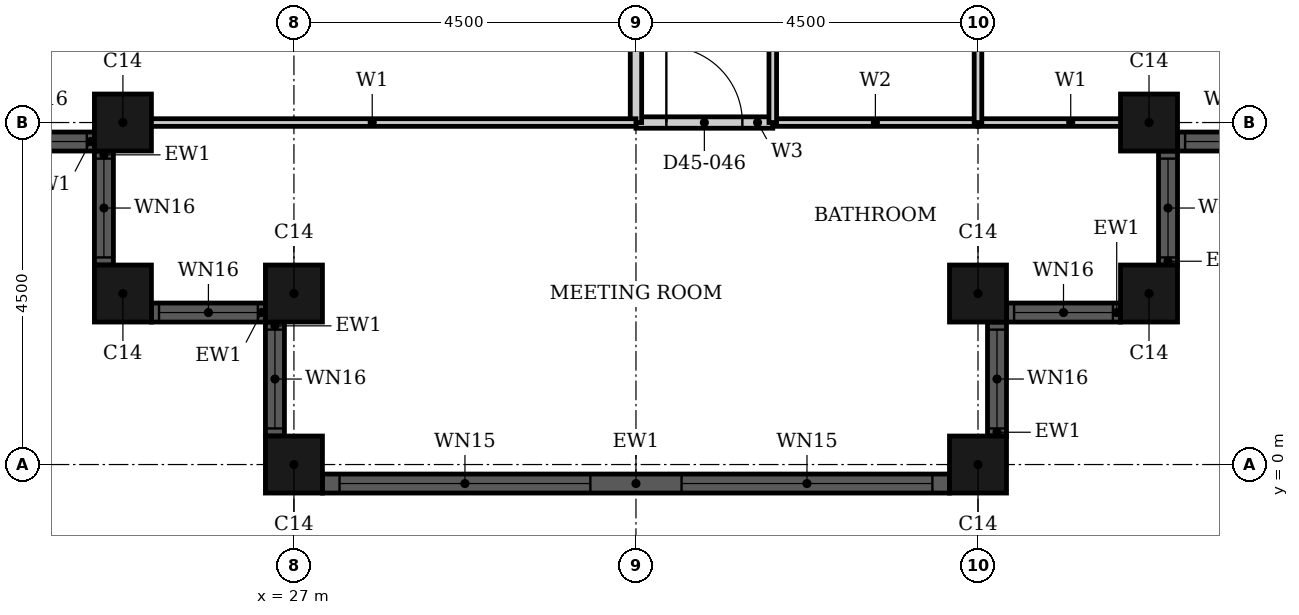
"""IFC4 building model, lengths in metres.
Left out: names, types, materials, properties, quantities, classifications, styles, units other than length and angle.
Written with IfcOpenShell. Run it as: python <this file> out.ifc"""

import sys

from ifc_helpers import new_model, si_unit, direction, frame, frame_2d, origin, origin_2d, place, context, subcontext, project, spatial, rectangle, hollow_rectangle, extrude, element, fill, save


model = new_model("IFC4")
c1 = context("Model", 3, precision=1e-05, world=origin(), true_north=direction((0.0, 1.0)))
c2 = subcontext(c1, "Body", "Model", "MODEL_VIEW")
j1 = project(units=[si_unit("LENGTHUNIT", "METRE"), si_unit("PLANEANGLEUNIT", "RADIAN")], contexts=[c1])
p1 = place(None, origin())
s1 = spatial("IfcSite", under=j1, at=p1, CompositionType="ELEMENT")
p2 = place(p1, origin())
s2 = spatial("IfcBuilding", under=s1, at=p2, CompositionType="ELEMENT")
p3 = place(p2, frame((0.0, 0.0, 180.2)))
s3 = spatial("IfcBuildingStorey", under=s2, at=p3, CompositionType="ELEMENT", Elevation=180.2)
for number, where, z_axis, x_axis in (
    (1, (24.75, 4.5, 0.0), (0.0, 0.0, 1.0), (1.0, 0.0, 0.0)),
    (2, (24.75, 2.25, 0.0), (0.0, 0.0, 1.0), (1.0, 0.0, 0.0)),
    (3, (27.0, 2.25, 0.0), (0.0, 0.0, 1.0), (1.0, 0.0, 0.0)),
    (4, (27.0, 0.0, 0.0), (0.0, 0.0, 1.0), (1.0, 0.0, 0.0)),
    (5, (36.0, 0.0, 0.0), (0.0, 0.0, 1.0), (1.0, 0.0, 0.0)),
    (6, (36.0, 2.25, 0.0), (0.0, 0.0, 1.0), (1.0, 0.0, 0.0)),
    (7, (38.25, 2.25, 0.0), (0.0, 0.0, 1.0), (1.0, 0.0, 0.0)),
    (8, (38.25, 4.5, 0.0), (0.0, 0.0, 1.0), (1.0, 0.0, 0.0)),
):
    element("IfcColumn", number, at=place(p3, frame(where, z_axis=z_axis, x_axis=x_axis)), inside=s3, PredefinedType="COLUMN", context=c2, shape_type="SweptSolid", body=[
        extrude(hollow_rectangle(XDim=0.75, YDim=0.75, WallThickness=0.024, at=origin_2d()), origin(), (0.0, 0.0, 1.0), 3.7),
    ])
p4 = place(p3, frame((22.875, 4.25, 0.0), z_axis=(0.0, 0.0, 1.0), x_axis=(1.0, 0.0, 0.0)))
e9 = element("IfcWall", 9, at=p4, inside=s3, PredefinedType="SOLIDWALL", context=c2, shape_type="SweptSolid", body=[
    extrude(rectangle(XDim=1.5, YDim=0.25, at=frame_2d((0.75, 0.0))), origin(), (0.0, 0.0, 1.0), 3.7),
])
p5 = place(p4, frame((0.1, 0.0, 0.9)))
e10 = element("IfcOpeningElement", 10, at=p5, cuts=e9, PredefinedType="OPENING", context=c2, shape_type="SweptSolid", body=[
    extrude(rectangle(XDim=1.3, YDim=1.85, at=frame_2d((0.65, 0.925))), frame((0.0, 0.135, 0.0), z_axis=(0.0, -1.0, 0.0), x_axis=(1.0, 0.0, 0.0)), (0.0, 0.0, 1.0), 0.27),
])
p6 = place(p3, frame((24.5, 4.125, 0.0), z_axis=(0.0, 0.0, 1.0), x_axis=(0.0, -1.0, 0.0)))
e11 = element("IfcWall", 11, at=p6, inside=s3, PredefinedType="SOLIDWALL", context=c2, shape_type="SweptSolid", body=[
    extrude(rectangle(XDim=1.5, YDim=0.25, at=frame_2d((0.75, 0.0))), origin(), (0.0, 0.0, 1.0), 3.7),
])
p7 = place(p6, frame((0.1, 0.0, 0.9)))
e12 = element("IfcOpeningElement", 12, at=p7, cuts=e11, PredefinedType="OPENING", context=c2, shape_type="SweptSolid", body=[
    extrude(rectangle(XDim=1.3, YDim=1.85, at=frame_2d((0.65, 0.925))), frame((0.0, 0.135, 0.0), z_axis=(0.0, -1.0, 0.0), x_axis=(1.0, 0.0, 0.0)), (0.0, 0.0, 1.0), 0.27),
])
p8 = place(p3, frame((25.125, 2.0, 0.0), z_axis=(0.0, 0.0, 1.0), x_axis=(1.0, 0.0, 0.0)))
e13 = element("IfcWall", 13, at=p8, inside=s3, PredefinedType="SOLIDWALL", context=c2, shape_type="SweptSolid", body=[
    extrude(rectangle(XDim=1.5, YDim=0.25, at=frame_2d((0.75, 0.0))), origin(), (0.0, 0.0, 1.0), 3.7),
])
p9 = place(p8, frame((0.1, 0.0, 0.9)))
e14 = element("IfcOpeningElement", 14, at=p9, cuts=e13, PredefinedType="OPENING", context=c2, shape_type="SweptSolid", body=[
    extrude(rectangle(XDim=1.3, YDim=1.85, at=frame_2d((0.65, 0.925))), frame((0.0, 0.135, 0.0), z_axis=(0.0, -1.0, 0.0), x_axis=(1.0, 0.0, 0.0)), (0.0, 0.0, 1.0), 0.27),
])
p10 = place(p3, frame((26.75, 1.875, 0.0), z_axis=(0.0, 0.0, 1.0), x_axis=(0.0, -1.0, 0.0)))
e15 = element("IfcWall", 15, at=p10, inside=s3, PredefinedType="SOLIDWALL", context=c2, shape_type="SweptSolid", body=[
    extrude(rectangle(XDim=1.5, YDim=0.25, at=frame_2d((0.75, 0.0))), origin(), (0.0, 0.0, 1.0), 3.7),
])
p11 = place(p10, frame((0.1, 0.0, 0.9)))
e16 = element("IfcOpeningElement", 16, at=p11, cuts=e15, PredefinedType="OPENING", context=c2, shape_type="SweptSolid", body=[
    extrude(rectangle(XDim=1.3, YDim=1.85, at=frame_2d((0.65, 0.925))), frame((0.0, 0.135, 0.0), z_axis=(0.0, -1.0, 0.0), x_axis=(1.0, 0.0, 0.0)), (0.0, 0.0, 1.0), 0.27),
])
p12 = place(p3, frame((27.375, -0.25, 0.0), z_axis=(0.0, 0.0, 1.0), x_axis=(1.0, 0.0, 0.0)))
e17 = element("IfcWall", 17, at=p12, inside=s3, PredefinedType="SOLIDWALL", context=c2, shape_type="SweptSolid", body=[
    extrude(rectangle(XDim=8.25, YDim=0.25, at=frame_2d((4.125, 0.0))), origin(), (0.0, 0.0, 1.0), 3.7),
])
p13 = place(p12, frame((0.225, 0.0, 0.45)))
e18 = element("IfcOpeningElement", 18, at=p13, cuts=e17, PredefinedType="OPENING", context=c2, shape_type="SweptSolid", body=[
    extrude(rectangle(XDim=3.3, YDim=2.3, at=frame_2d((1.65, 1.15))), frame((0.0, 0.135, 0.0), z_axis=(0.0, -1.0, 0.0), x_axis=(1.0, 0.0, 0.0)), (0.0, 0.0, 1.0), 0.27),
])
p14 = place(p12, frame((4.725, 0.0, 0.45)))
e19 = element("IfcOpeningElement", 19, at=p14, cuts=e17, PredefinedType="OPENING", context=c2, shape_type="SweptSolid", body=[
    extrude(rectangle(XDim=3.3, YDim=2.3, at=frame_2d((1.65, 1.15))), frame((0.0, 0.135, 0.0), z_axis=(0.0, -1.0, 0.0), x_axis=(1.0, 0.0, 0.0)), (0.0, 0.0, 1.0), 0.27),
])
p15 = place(p3, frame((36.25, 0.375, 0.0), z_axis=(0.0, 0.0, 1.0), x_axis=(0.0, 1.0, 0.0)))
e20 = element("IfcWall", 20, at=p15, inside=s3, PredefinedType="SOLIDWALL", context=c2, shape_type="SweptSolid", body=[
    extrude(rectangle(XDim=1.5, YDim=0.25, at=frame_2d((0.75, 0.0))), origin(), (0.0, 0.0, 1.0), 3.7),
])
p16 = place(p15, frame((0.1, 0.0, 0.9)))
e21 = element("IfcOpeningElement", 21, at=p16, cuts=e20, PredefinedType="OPENING", context=c2, shape_type="SweptSolid", body=[
    extrude(rectangle(XDim=1.3, YDim=1.85, at=frame_2d((0.65, 0.925))), frame((0.0, 0.135, 0.0), z_axis=(0.0, -1.0, 0.0), x_axis=(1.0, 0.0, 0.0)), (0.0, 0.0, 1.0), 0.27),
])
p17 = place(p3, frame((36.375, 2.0, 0.0), z_axis=(0.0, 0.0, 1.0), x_axis=(1.0, 0.0, 0.0)))
e22 = element("IfcWall", 22, at=p17, inside=s3, PredefinedType="SOLIDWALL", context=c2, shape_type="SweptSolid", body=[
    extrude(rectangle(XDim=1.5, YDim=0.25, at=frame_2d((0.75, 0.0))), origin(), (0.0, 0.0, 1.0), 3.7),
])
p18 = place(p17, frame((0.1, 0.0, 0.9)))
e23 = element("IfcOpeningElement", 23, at=p18, cuts=e22, PredefinedType="OPENING", context=c2, shape_type="SweptSolid", body=[
    extrude(rectangle(XDim=1.3, YDim=1.85, at=frame_2d((0.65, 0.925))), frame((0.0, 0.135, 0.0), z_axis=(0.0, -1.0, 0.0), x_axis=(1.0, 0.0, 0.0)), (0.0, 0.0, 1.0), 0.27),
])
p19 = place(p3, frame((38.5, 2.625, 0.0), z_axis=(0.0, 0.0, 1.0), x_axis=(0.0, 1.0, 0.0)))
e24 = element("IfcWall", 24, at=p19, inside=s3, PredefinedType="SOLIDWALL", context=c2, shape_type="SweptSolid", body=[
    extrude(rectangle(XDim=1.5, YDim=0.25, at=frame_2d((0.75, 0.0))), origin(), (0.0, 0.0, 1.0), 3.7),
])
p20 = place(p19, frame((0.1, 0.0, 0.9)))
e25 = element("IfcOpeningElement", 25, at=p20, cuts=e24, PredefinedType="OPENING", context=c2, shape_type="SweptSolid", body=[
    extrude(rectangle(XDim=1.3, YDim=1.85, at=frame_2d((0.65, 0.925))), frame((0.0, 0.135, 0.0), z_axis=(0.0, -1.0, 0.0), x_axis=(1.0, 0.0, 0.0)), (0.0, 0.0, 1.0), 0.27),
])
p21 = place(p3, frame((38.625, 4.25, 0.0), z_axis=(0.0, 0.0, 1.0), x_axis=(1.0, 0.0, 0.0)))
e26 = element("IfcWall", 26, at=p21, inside=s3, PredefinedType="SOLIDWALL", context=c2, shape_type="SweptSolid", body=[
    extrude(rectangle(XDim=1.5, YDim=0.25, at=frame_2d((0.75, 0.0))), origin(), (0.0, 0.0, 1.0), 3.7),
])
p22 = place(p21, frame((0.1, 0.0, 0.9)))
e27 = element("IfcOpeningElement", 27, at=p22, cuts=e26, PredefinedType="OPENING", context=c2, shape_type="SweptSolid", body=[
    extrude(rectangle(XDim=1.3, YDim=1.85, at=frame_2d((0.65, 0.925))), frame((0.0, 0.135, 0.0), z_axis=(0.0, -1.0, 0.0), x_axis=(1.0, 0.0, 0.0)), (0.0, 0.0, 1.0), 0.27),
])
p23 = place(p3, frame((31.5, 4.5, 0.0), z_axis=(0.0, 0.0, 1.0), x_axis=(1.0, 0.0, 0.0)))
e28 = element("IfcWall", 28, at=p23, inside=s3, PredefinedType="PARTITIONING", context=c2, shape_type="SweptSolid", body=[
    extrude(rectangle(XDim=1.8, YDim=0.15, at=frame_2d((0.9, 0.0))), origin(), (0.0, 0.0, 1.0), 3.4),
])
p24 = place(p23, frame((0.4, 0.0, 0.0)))
e29 = element("IfcOpeningElement", 29, at=p24, cuts=e28, PredefinedType="OPENING", context=c2, shape_type="SweptSolid", body=[
    extrude(rectangle(XDim=1.0, YDim=2.1, at=frame_2d((0.5, 1.05))), frame((0.0, 0.085, 0.0), z_axis=(0.0, -1.0, 0.0), x_axis=(1.0, 0.0, 0.0)), (0.0, 0.0, 1.0), 0.17),
])
p25 = place(p3, frame((31.5, 4.5, 0.0), z_axis=(0.0, 0.0, 1.0), x_axis=(0.0, 1.0, 0.0)))
e30 = element("IfcWall", 30, at=p25, inside=s3, PredefinedType="PARTITIONING", context=c2, shape_type="SweptSolid", body=[
    extrude(rectangle(XDim=16.2, YDim=0.15, at=frame_2d((8.1, 0.0))), origin(), (0.0, 0.0, 1.0), 2.68),
])
p26 = place(p25, frame((4.0, 0.0, 0.0)))
e31 = element("IfcOpeningElement", 31, at=p26, cuts=e30, PredefinedType="OPENING", context=c2, shape_type="SweptSolid", body=[
    extrude(rectangle(XDim=1.0, YDim=2.1, at=frame_2d((0.5, 1.05))), frame((0.0, 0.085, 0.0), z_axis=(0.0, -1.0, 0.0), x_axis=(1.0, 0.0, 0.0)), (0.0, 0.0, 1.0), 0.17),
])
p27 = place(p3, frame((36.0, 4.5, 0.0), z_axis=(0.0, 0.0, 1.0), x_axis=(1.0, 0.0, 0.0)))
e32 = element("IfcWall", 32, at=p27, inside=s3, PredefinedType="PARTITIONING", context=c2, shape_type="SweptSolid", body=[
    extrude(rectangle(XDim=2.44, YDim=0.1, at=frame_2d((1.22, 0.0))), origin(), (0.0, 0.0, 1.0), 3.4),
])
p28 = place(p3, frame((24.56, 4.5, 0.0), z_axis=(0.0, 0.0, 1.0), x_axis=(1.0, 0.0, 0.0)))
e33 = element("IfcWall", 33, at=p28, inside=s3, PredefinedType="PARTITIONING", context=c2, shape_type="SweptSolid", body=[
    extrude(rectangle(XDim=6.94, YDim=0.1, at=frame_2d((3.47, 0.0))), origin(), (0.0, 0.0, 1.0), 3.4),
])
p29 = place(p3, frame((33.3, 4.5, 0.0), z_axis=(0.0, 0.0, 1.0), x_axis=(1.0, 0.0, 0.0)))
e34 = element("IfcWall", 34, at=p29, inside=s3, PredefinedType="PARTITIONING", context=c2, shape_type="SweptSolid", body=[
    extrude(rectangle(XDim=2.7, YDim=0.1, at=frame_2d((1.35, 0.0))), origin(), (0.0, 0.0, 1.0), 3.4),
])
p30 = place(p3, frame((33.3, 4.5, 0.0), z_axis=(0.0, 0.0, 1.0), x_axis=(0.0, 1.0, 0.0)))
e35 = element("IfcWall", 35, at=p30, inside=s3, PredefinedType="PARTITIONING", context=c2, shape_type="SweptSolid", body=[
    extrude(rectangle(XDim=2.4, YDim=0.1, at=frame_2d((1.2, 0.0))), origin(), (0.0, 0.0, 1.0), 3.4),
])
p31 = place(p3, frame((36.0, 4.5, 0.0), z_axis=(0.0, 0.0, 1.0), x_axis=(0.0, 1.0, 0.0)))
e36 = element("IfcWall", 36, at=p31, inside=s3, PredefinedType="PARTITIONING", context=c2, shape_type="SweptSolid", body=[
    extrude(rectangle(XDim=2.4, YDim=0.1, at=frame_2d((1.2, 0.0))), origin(), (0.0, 0.0, 1.0), 2.68),
])
p32 = place(p5, origin())
e37 = element("IfcWindow", 37, at=p32, inside=s3, PartitioningType="SINGLE_PANEL", PredefinedType="WINDOW", context=c2, shape_type="SweptSolid", body=[
    extrude(rectangle(XDim=1.3, YDim=1.85, at=frame_2d((0.65, 0.925))), frame((0.0, 0.03, 0.0), z_axis=(0.0, -1.0, 0.0), x_axis=(1.0, 0.0, 0.0)), (0.0, 0.0, 1.0), 0.06),
])
fill(e10, e37)
p33 = place(p7, origin())
e38 = element("IfcWindow", 38, at=p33, inside=s3, PartitioningType="SINGLE_PANEL", PredefinedType="WINDOW", context=c2, shape_type="SweptSolid", body=[
    extrude(rectangle(XDim=1.3, YDim=1.85, at=frame_2d((0.65, 0.925))), frame((0.0, 0.03, 0.0), z_axis=(0.0, -1.0, 0.0), x_axis=(1.0, 0.0, 0.0)), (0.0, 0.0, 1.0), 0.06),
])
fill(e12, e38)
p34 = place(p9, origin())
e39 = element("IfcWindow", 39, at=p34, inside=s3, PartitioningType="SINGLE_PANEL", PredefinedType="WINDOW", context=c2, shape_type="SweptSolid", body=[
    extrude(rectangle(XDim=1.3, YDim=1.85, at=frame_2d((0.65, 0.925))), frame((0.0, 0.03, 0.0), z_axis=(0.0, -1.0, 0.0), x_axis=(1.0, 0.0, 0.0)), (0.0, 0.0, 1.0), 0.06),
])
fill(e14, e39)
p35 = place(p11, origin())
e40 = element("IfcWindow", 40, at=p35, inside=s3, PartitioningType="SINGLE_PANEL", PredefinedType="WINDOW", context=c2, shape_type="SweptSolid", body=[
    extrude(rectangle(XDim=1.3, YDim=1.85, at=frame_2d((0.65, 0.925))), frame((0.0, 0.03, 0.0), z_axis=(0.0, -1.0, 0.0), x_axis=(1.0, 0.0, 0.0)), (0.0, 0.0, 1.0), 0.06),
])
fill(e16, e40)
p36 = place(p13, origin())
e41 = element("IfcWindow", 41, at=p36, inside=s3, PartitioningType="SINGLE_PANEL", PredefinedType="WINDOW", context=c2, shape_type="SweptSolid", body=[
    extrude(rectangle(XDim=3.3, YDim=2.3, at=frame_2d((1.65, 1.15))), frame((0.0, 0.03, 0.0), z_axis=(0.0, -1.0, 0.0), x_axis=(1.0, 0.0, 0.0)), (0.0, 0.0, 1.0), 0.06),
])
fill(e18, e41)
p37 = place(p14, origin())
e42 = element("IfcWindow", 42, at=p37, inside=s3, PartitioningType="SINGLE_PANEL", PredefinedType="WINDOW", context=c2, shape_type="SweptSolid", body=[
    extrude(rectangle(XDim=3.3, YDim=2.3, at=frame_2d((1.65, 1.15))), frame((0.0, 0.03, 0.0), z_axis=(0.0, -1.0, 0.0), x_axis=(1.0, 0.0, 0.0)), (0.0, 0.0, 1.0), 0.06),
])
fill(e19, e42)
p38 = place(p16, origin())
e43 = element("IfcWindow", 43, at=p38, inside=s3, PartitioningType="SINGLE_PANEL", PredefinedType="WINDOW", context=c2, shape_type="SweptSolid", body=[
    extrude(rectangle(XDim=1.3, YDim=1.85, at=frame_2d((0.65, 0.925))), frame((0.0, 0.03, 0.0), z_axis=(0.0, -1.0, 0.0), x_axis=(1.0, 0.0, 0.0)), (0.0, 0.0, 1.0), 0.06),
])
fill(e21, e43)
p39 = place(p18, origin())
e44 = element("IfcWindow", 44, at=p39, inside=s3, PartitioningType="SINGLE_PANEL", PredefinedType="WINDOW", context=c2, shape_type="SweptSolid", body=[
    extrude(rectangle(XDim=1.3, YDim=1.85, at=frame_2d((0.65, 0.925))), frame((0.0, 0.03, 0.0), z_axis=(0.0, -1.0, 0.0), x_axis=(1.0, 0.0, 0.0)), (0.0, 0.0, 1.0), 0.06),
])
fill(e23, e44)
p40 = place(p20, origin())
e45 = element("IfcWindow", 45, at=p40, inside=s3, PartitioningType="SINGLE_PANEL", PredefinedType="WINDOW", context=c2, shape_type="SweptSolid", body=[
    extrude(rectangle(XDim=1.3, YDim=1.85, at=frame_2d((0.65, 0.925))), frame((0.0, 0.03, 0.0), z_axis=(0.0, -1.0, 0.0), x_axis=(1.0, 0.0, 0.0)), (0.0, 0.0, 1.0), 0.06),
])
fill(e25, e45)
p41 = place(p22, origin())
e46 = element("IfcWindow", 46, at=p41, inside=s3, PartitioningType="SINGLE_PANEL", PredefinedType="WINDOW", context=c2, shape_type="SweptSolid", body=[
    extrude(rectangle(XDim=1.3, YDim=1.85, at=frame_2d((0.65, 0.925))), frame((0.0, 0.03, 0.0), z_axis=(0.0, -1.0, 0.0), x_axis=(1.0, 0.0, 0.0)), (0.0, 0.0, 1.0), 0.06),
])
fill(e27, e46)
p42 = place(p24, origin())
e47 = element("IfcDoor", 47, at=p42, inside=s3, OperationType="SINGLE_SWING_RIGHT", PredefinedType="DOOR", context=c2, shape_type="SweptSolid", body=[
    extrude(rectangle(XDim=1.0, YDim=2.1, at=frame_2d((0.5, 1.05))), frame((0.0, 0.025, 0.0), z_axis=(0.0, -1.0, 0.0), x_axis=(1.0, 0.0, 0.0)), (0.0, 0.0, 1.0), 0.05),
])
fill(e29, e47)
save(model, sys.argv[1])
